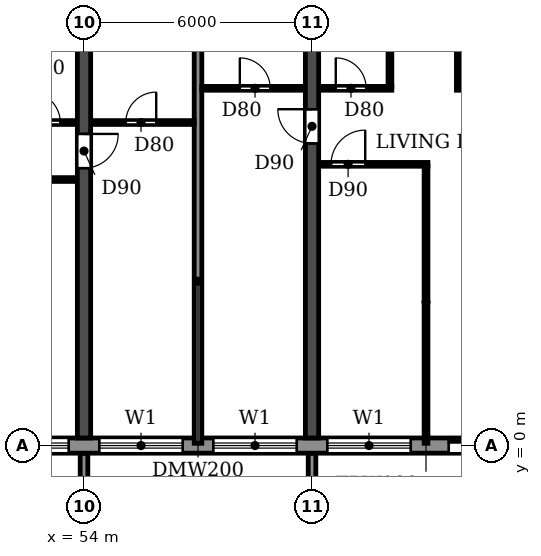
"""IFC4 building model, lengths in metres.
Left out: names, types, materials, properties, quantities, classifications, styles, units other than length and angle.
Written with IfcOpenShell. Run it as: python <this file> out.ifc"""

import sys

from ifc_helpers import new_model, si_unit, direction, frame, frame_2d, origin, place, context, subcontext, project, spatial, polyline, rectangle, outline, extrude, source, transform, mapped, element, fill, save


model = new_model("IFC4")
c1 = context("Model", 3, precision=1e-05, world=origin(), true_north=direction((0.0, 1.0)))
c2 = subcontext(c1, "Body", "Model", "MODEL_VIEW")
j1 = project(units=[si_unit("LENGTHUNIT", "METRE"), si_unit("PLANEANGLEUNIT", "RADIAN")], contexts=[c1])
p1 = place(None, origin())
s1 = spatial("IfcSite", under=j1, at=p1, CompositionType="ELEMENT")
p2 = place(p1, origin())
s2 = spatial("IfcBuilding", under=s1, at=p2, CompositionType="ELEMENT")
p3 = place(p2, frame((0.0, 0.0, 112.5)))
s3 = spatial("IfcBuildingStorey", under=s2, at=p3, CompositionType="ELEMENT", Elevation=112.5)
p4 = place(p3, frame((54.0, 0.2, 0.0), z_axis=(0.0, 0.0, 1.0), x_axis=(0.0, 1.0, 0.0)))
e1 = element("IfcWall", 1, at=p4, inside=s3, PredefinedType="SHEAR", context=c2, shape_type="SweptSolid", body=[
    extrude(rectangle(XDim=11.675, YDim=0.35, at=frame_2d((5.837, 0.0))), origin(), (0.0, 0.0, 1.0), 2.95),
])
p5 = place(p4, frame((7.1, 0.0, 0.0)))
e2 = element("IfcOpeningElement", 2, at=p5, cuts=e1, PredefinedType="OPENING", context=c2, shape_type="SweptSolid", body=[
    extrude(rectangle(XDim=0.9, YDim=2.1, at=frame_2d((0.45, 1.05))), frame((0.0, 0.185, 0.0), z_axis=(0.0, -1.0, 0.0), x_axis=(1.0, 0.0, 0.0)), (0.0, 0.0, 1.0), 0.37),
])
p6 = place(p3, frame((60.0, 0.2, 0.0), z_axis=(0.0, 0.0, 1.0), x_axis=(0.0, 1.0, 0.0)))
e3 = element("IfcWall", 3, at=p6, inside=s3, PredefinedType="SHEAR", context=c2, shape_type="SweptSolid", body=[
    extrude(rectangle(XDim=11.675, YDim=0.35, at=frame_2d((5.837, 0.0))), origin(), (0.0, 0.0, 1.0), 2.95),
])
p7 = place(p6, frame((7.75, 0.0, 0.0)))
e4 = element("IfcOpeningElement", 4, at=p7, cuts=e3, PredefinedType="OPENING", context=c2, shape_type="SweptSolid", body=[
    extrude(rectangle(XDim=0.9, YDim=2.1, at=frame_2d((0.45, 1.05))), frame((0.0, 0.185, 0.0), z_axis=(0.0, -1.0, 0.0), x_axis=(1.0, 0.0, 0.0)), (0.0, 0.0, 1.0), 0.37),
])
p8 = place(p3, frame((16.683, 0.0, 0.0), z_axis=(0.0, 0.0, 1.0), x_axis=(1.0, 0.0, 0.0)))
e5 = element("IfcWall", 5, at=p8, inside=s3, PredefinedType="STANDARD", context=c2, shape_type="SweptSolid", body=[
    extrude(rectangle(XDim=68.634, YDim=0.4, at=frame_2d((34.317, 0.0))), origin(), (0.0, 0.0, 1.0), 2.95),
])
p9 = place(p8, frame((1.717, 0.0, 0.9)))
e6 = element("IfcOpeningElement", 6, at=p9, cuts=e5, PredefinedType="OPENING", context=c2, shape_type="SweptSolid", body=[
    extrude(rectangle(XDim=2.2, YDim=1.5, at=frame_2d((1.1, 0.75))), frame((0.0, 0.21, 0.0), z_axis=(0.0, -1.0, 0.0), x_axis=(1.0, 0.0, 0.0)), (0.0, 0.0, 1.0), 0.42),
])
p10 = place(p8, frame((4.717, 0.0, 0.9)))
e7 = element("IfcOpeningElement", 7, at=p10, cuts=e5, PredefinedType="OPENING", context=c2, shape_type="SweptSolid", body=[
    extrude(rectangle(XDim=2.2, YDim=1.5, at=frame_2d((1.1, 0.75))), frame((0.0, 0.21, 0.0), z_axis=(0.0, -1.0, 0.0), x_axis=(1.0, 0.0, 0.0)), (0.0, 0.0, 1.0), 0.42),
])
p11 = place(p8, frame((7.717, 0.0, 0.9)))
e8 = element("IfcOpeningElement", 8, at=p11, cuts=e5, PredefinedType="OPENING", context=c2, shape_type="SweptSolid", body=[
    extrude(rectangle(XDim=2.2, YDim=1.5, at=frame_2d((1.1, 0.75))), frame((0.0, 0.21, 0.0), z_axis=(0.0, -1.0, 0.0), x_axis=(1.0, 0.0, 0.0)), (0.0, 0.0, 1.0), 0.42),
])
p12 = place(p8, frame((10.917, 0.0, 0.0)))
e9 = element("IfcOpeningElement", 9, at=p12, cuts=e5, PredefinedType="OPENING", context=c2, shape_type="SweptSolid", body=[
    extrude(rectangle(XDim=1.8, YDim=2.4, at=frame_2d((0.9, 1.2))), frame((0.0, 0.21, 0.0), z_axis=(0.0, -1.0, 0.0), x_axis=(1.0, 0.0, 0.0)), (0.0, 0.0, 1.0), 0.42),
])
p13 = place(p8, frame((13.717, 0.0, 0.9)))
e10 = element("IfcOpeningElement", 10, at=p13, cuts=e5, PredefinedType="OPENING", context=c2, shape_type="SweptSolid", body=[
    extrude(rectangle(XDim=2.2, YDim=1.5, at=frame_2d((1.1, 0.75))), frame((0.0, 0.21, 0.0), z_axis=(0.0, -1.0, 0.0), x_axis=(1.0, 0.0, 0.0)), (0.0, 0.0, 1.0), 0.42),
])
p14 = place(p8, frame((16.717, 0.0, 0.9)))
e11 = element("IfcOpeningElement", 11, at=p14, cuts=e5, PredefinedType="OPENING", context=c2, shape_type="SweptSolid", body=[
    extrude(rectangle(XDim=2.2, YDim=1.5, at=frame_2d((1.1, 0.75))), frame((0.0, 0.21, 0.0), z_axis=(0.0, -1.0, 0.0), x_axis=(1.0, 0.0, 0.0)), (0.0, 0.0, 1.0), 0.42),
])
p15 = place(p8, frame((19.717, 0.0, 0.9)))
e12 = element("IfcOpeningElement", 12, at=p15, cuts=e5, PredefinedType="OPENING", context=c2, shape_type="SweptSolid", body=[
    extrude(rectangle(XDim=2.2, YDim=1.5, at=frame_2d((1.1, 0.75))), frame((0.0, 0.21, 0.0), z_axis=(0.0, -1.0, 0.0), x_axis=(1.0, 0.0, 0.0)), (0.0, 0.0, 1.0), 0.42),
])
p16 = place(p8, frame((22.717, 0.0, 0.9)))
e13 = element("IfcOpeningElement", 13, at=p16, cuts=e5, PredefinedType="OPENING", context=c2, shape_type="SweptSolid", body=[
    extrude(rectangle(XDim=2.2, YDim=1.5, at=frame_2d((1.1, 0.75))), frame((0.0, 0.21, 0.0), z_axis=(0.0, -1.0, 0.0), x_axis=(1.0, 0.0, 0.0)), (0.0, 0.0, 1.0), 0.42),
])
p17 = place(p8, frame((25.717, 0.0, 0.9)))
e14 = element("IfcOpeningElement", 14, at=p17, cuts=e5, PredefinedType="OPENING", context=c2, shape_type="SweptSolid", body=[
    extrude(rectangle(XDim=2.2, YDim=1.5, at=frame_2d((1.1, 0.75))), frame((0.0, 0.21, 0.0), z_axis=(0.0, -1.0, 0.0), x_axis=(1.0, 0.0, 0.0)), (0.0, 0.0, 1.0), 0.42),
])
p18 = place(p8, frame((28.717, 0.0, 0.9)))
e15 = element("IfcOpeningElement", 15, at=p18, cuts=e5, PredefinedType="OPENING", context=c2, shape_type="SweptSolid", body=[
    extrude(rectangle(XDim=2.2, YDim=1.5, at=frame_2d((1.1, 0.75))), frame((0.0, 0.21, 0.0), z_axis=(0.0, -1.0, 0.0), x_axis=(1.0, 0.0, 0.0)), (0.0, 0.0, 1.0), 0.42),
])
p19 = place(p8, frame((31.917, 0.0, 0.0)))
e16 = element("IfcOpeningElement", 16, at=p19, cuts=e5, PredefinedType="OPENING", context=c2, shape_type="SweptSolid", body=[
    extrude(rectangle(XDim=1.8, YDim=2.4, at=frame_2d((0.9, 1.2))), frame((0.0, 0.21, 0.0), z_axis=(0.0, -1.0, 0.0), x_axis=(1.0, 0.0, 0.0)), (0.0, 0.0, 1.0), 0.42),
])
p20 = place(p8, frame((34.717, 0.0, 0.9)))
e17 = element("IfcOpeningElement", 17, at=p20, cuts=e5, PredefinedType="OPENING", context=c2, shape_type="SweptSolid", body=[
    extrude(rectangle(XDim=2.2, YDim=1.5, at=frame_2d((1.1, 0.75))), frame((0.0, 0.21, 0.0), z_axis=(0.0, -1.0, 0.0), x_axis=(1.0, 0.0, 0.0)), (0.0, 0.0, 1.0), 0.42),
])
p21 = place(p8, frame((37.717, 0.0, 0.9)))
e18 = element("IfcOpeningElement", 18, at=p21, cuts=e5, PredefinedType="OPENING", context=c2, shape_type="SweptSolid", body=[
    extrude(rectangle(XDim=2.2, YDim=1.5, at=frame_2d((1.1, 0.75))), frame((0.0, 0.21, 0.0), z_axis=(0.0, -1.0, 0.0), x_axis=(1.0, 0.0, 0.0)), (0.0, 0.0, 1.0), 0.42),
])
p22 = place(p8, frame((40.717, 0.0, 0.9)))
e19 = element("IfcOpeningElement", 19, at=p22, cuts=e5, PredefinedType="OPENING", context=c2, shape_type="SweptSolid", body=[
    extrude(rectangle(XDim=2.2, YDim=1.5, at=frame_2d((1.1, 0.75))), frame((0.0, 0.21, 0.0), z_axis=(0.0, -1.0, 0.0), x_axis=(1.0, 0.0, 0.0)), (0.0, 0.0, 1.0), 0.42),
])
p23 = place(p8, frame((43.717, 0.0, 0.9)))
e20 = element("IfcOpeningElement", 20, at=p23, cuts=e5, PredefinedType="OPENING", context=c2, shape_type="SweptSolid", body=[
    extrude(rectangle(XDim=2.2, YDim=1.5, at=frame_2d((1.1, 0.75))), frame((0.0, 0.21, 0.0), z_axis=(0.0, -1.0, 0.0), x_axis=(1.0, 0.0, 0.0)), (0.0, 0.0, 1.0), 0.42),
])
p24 = place(p8, frame((46.917, 0.0, 0.0)))
e21 = element("IfcOpeningElement", 21, at=p24, cuts=e5, PredefinedType="OPENING", context=c2, shape_type="SweptSolid", body=[
    extrude(rectangle(XDim=1.8, YDim=2.4, at=frame_2d((0.9, 1.2))), frame((0.0, 0.21, 0.0), z_axis=(0.0, -1.0, 0.0), x_axis=(1.0, 0.0, 0.0)), (0.0, 0.0, 1.0), 0.42),
])
p25 = place(p8, frame((49.717, 0.0, 0.9)))
e22 = element("IfcOpeningElement", 22, at=p25, cuts=e5, PredefinedType="OPENING", context=c2, shape_type="SweptSolid", body=[
    extrude(rectangle(XDim=2.2, YDim=1.5, at=frame_2d((1.1, 0.75))), frame((0.0, 0.21, 0.0), z_axis=(0.0, -1.0, 0.0), x_axis=(1.0, 0.0, 0.0)), (0.0, 0.0, 1.0), 0.42),
])
p26 = place(p8, frame((52.717, 0.0, 0.9)))
e23 = element("IfcOpeningElement", 23, at=p26, cuts=e5, PredefinedType="OPENING", context=c2, shape_type="SweptSolid", body=[
    extrude(rectangle(XDim=2.2, YDim=1.5, at=frame_2d((1.1, 0.75))), frame((0.0, 0.21, 0.0), z_axis=(0.0, -1.0, 0.0), x_axis=(1.0, 0.0, 0.0)), (0.0, 0.0, 1.0), 0.42),
])
p27 = place(p8, frame((55.717, 0.0, 0.9)))
e24 = element("IfcOpeningElement", 24, at=p27, cuts=e5, PredefinedType="OPENING", context=c2, shape_type="SweptSolid", body=[
    extrude(rectangle(XDim=2.2, YDim=1.5, at=frame_2d((1.1, 0.75))), frame((0.0, 0.21, 0.0), z_axis=(0.0, -1.0, 0.0), x_axis=(1.0, 0.0, 0.0)), (0.0, 0.0, 1.0), 0.42),
])
p28 = place(p8, frame((58.717, 0.0, 0.9)))
e25 = element("IfcOpeningElement", 25, at=p28, cuts=e5, PredefinedType="OPENING", context=c2, shape_type="SweptSolid", body=[
    extrude(rectangle(XDim=2.2, YDim=1.5, at=frame_2d((1.1, 0.75))), frame((0.0, 0.21, 0.0), z_axis=(0.0, -1.0, 0.0), x_axis=(1.0, 0.0, 0.0)), (0.0, 0.0, 1.0), 0.42),
])
p29 = place(p8, frame((61.717, 0.0, 0.9)))
e26 = element("IfcOpeningElement", 26, at=p29, cuts=e5, PredefinedType="OPENING", context=c2, shape_type="SweptSolid", body=[
    extrude(rectangle(XDim=2.2, YDim=1.5, at=frame_2d((1.1, 0.75))), frame((0.0, 0.21, 0.0), z_axis=(0.0, -1.0, 0.0), x_axis=(1.0, 0.0, 0.0)), (0.0, 0.0, 1.0), 0.42),
])
p30 = place(p8, frame((64.717, 0.0, 0.9)))
e27 = element("IfcOpeningElement", 27, at=p30, cuts=e5, PredefinedType="OPENING", context=c2, shape_type="SweptSolid", body=[
    extrude(rectangle(XDim=2.2, YDim=1.5, at=frame_2d((1.1, 0.75))), frame((0.0, 0.21, 0.0), z_axis=(0.0, -1.0, 0.0), x_axis=(1.0, 0.0, 0.0)), (0.0, 0.0, 1.0), 0.42),
])
m1 = source(origin(), c2, "Body", "SweptSolid", [
    extrude(outline(polyline([(0.0, 0.0), (0.2, 0.0), (0.2, 1.65), (0.0, 1.65), (0.0, 0.0)])), origin(), (0.0, 0.0, 1.0), 3.1),
])
for number, where in (
    (28, (53.9, -1.85, 0.0)),
    (29, (59.9, -1.85, 0.0)),
):
    element("IfcWall", number, at=place(p3, frame(where)), inside=s3, PredefinedType="STANDARD", context=c2, shape_type="MappedRepresentation", body=[
        mapped(m1, transform((0.0, 0.0, 0.0))),
    ])
p31 = place(p3, frame((57.0, 0.06, 0.0), z_axis=(0.0, 0.0, 1.0), x_axis=(0.0, 1.0, 0.0)))
e30 = element("IfcWall", 30, at=p31, inside=s3, PredefinedType="PARTITIONING", context=c2, shape_type="SweptSolid", body=[
    extrude(rectangle(XDim=11.805, YDim=0.2, at=frame_2d((5.902, 0.0))), origin(), (0.0, 0.0, 1.0), 2.95),
])
p32 = place(p3, frame((50.95, 7.0, 0.0), z_axis=(0.0, 0.0, 1.0), x_axis=(1.0, 0.0, 0.0)))
e31 = element("IfcWall", 31, at=p32, inside=s3, PredefinedType="PARTITIONING", context=c2, shape_type="SweptSolid", body=[
    extrude(rectangle(XDim=2.865, YDim=0.1, at=frame_2d((1.433, 0.0))), origin(), (0.0, 0.0, 1.0), 2.95),
])
p33 = place(p32, frame((0.55, 0.0, 0.0)))
e32 = element("IfcOpeningElement", 32, at=p33, cuts=e31, PredefinedType="OPENING", context=c2, shape_type="SweptSolid", body=[
    extrude(rectangle(XDim=0.9, YDim=2.1, at=frame_2d((0.45, 1.05))), frame((0.0, 0.06, 0.0), z_axis=(0.0, -1.0, 0.0), x_axis=(1.0, 0.0, 0.0)), (0.0, 0.0, 1.0), 0.12),
])
p34 = place(p3, frame((60.185, 7.4, 0.0), z_axis=(0.0, 0.0, 1.0), x_axis=(1.0, 0.0, 0.0)))
e33 = element("IfcWall", 33, at=p34, inside=s3, PredefinedType="PARTITIONING", context=c2, shape_type="SweptSolid", body=[
    extrude(rectangle(XDim=2.865, YDim=0.1, at=frame_2d((1.433, 0.0))), origin(), (0.0, 0.0, 1.0), 2.95),
])
p35 = place(p34, frame((0.315, 0.0, 0.0)))
e34 = element("IfcOpeningElement", 34, at=p35, cuts=e33, PredefinedType="OPENING", context=c2, shape_type="SweptSolid", body=[
    extrude(rectangle(XDim=0.9, YDim=2.1, at=frame_2d((0.45, 1.05))), frame((0.0, 0.06, 0.0), z_axis=(0.0, -1.0, 0.0), x_axis=(1.0, 0.0, 0.0)), (0.0, 0.0, 1.0), 0.12),
])
p36 = place(p3, frame((51.9, 8.5, 0.0), z_axis=(0.0, 0.0, 1.0), x_axis=(1.0, 0.0, 0.0)))
e35 = element("IfcWall", 35, at=p36, inside=s3, PredefinedType="PARTITIONING", context=c2, shape_type="SweptSolid", body=[
    extrude(rectangle(XDim=1.915, YDim=0.1, at=frame_2d((0.958, 0.0))), origin(), (0.0, 0.0, 1.0), 2.95),
])
p37 = place(p36, frame((0.675, 0.0, 0.0)))
e36 = element("IfcOpeningElement", 36, at=p37, cuts=e35, PredefinedType="OPENING", context=c2, shape_type="SweptSolid", body=[
    extrude(rectangle(XDim=0.8, YDim=2.1, at=frame_2d((0.4, 1.05))), frame((0.0, 0.06, 0.0), z_axis=(0.0, -1.0, 0.0), x_axis=(1.0, 0.0, 0.0)), (0.0, 0.0, 1.0), 0.12),
])
p38 = place(p3, frame((54.185, 8.5, 0.0), z_axis=(0.0, 0.0, 1.0), x_axis=(1.0, 0.0, 0.0)))
e37 = element("IfcWall", 37, at=p38, inside=s3, PredefinedType="PARTITIONING", context=c2, shape_type="SweptSolid", body=[
    extrude(rectangle(XDim=2.715, YDim=0.1, at=frame_2d((1.357, 0.0))), origin(), (0.0, 0.0, 1.0), 2.95),
])
p39 = place(p38, frame((0.915, 0.0, 0.0)))
e38 = element("IfcOpeningElement", 38, at=p39, cuts=e37, PredefinedType="OPENING", context=c2, shape_type="SweptSolid", body=[
    extrude(rectangle(XDim=0.8, YDim=2.1, at=frame_2d((0.4, 1.05))), frame((0.0, 0.06, 0.0), z_axis=(0.0, -1.0, 0.0), x_axis=(1.0, 0.0, 0.0)), (0.0, 0.0, 1.0), 0.12),
])
p40 = place(p3, frame((57.1, 9.4, 0.0), z_axis=(0.0, 0.0, 1.0), x_axis=(1.0, 0.0, 0.0)))
e39 = element("IfcWall", 39, at=p40, inside=s3, PredefinedType="PARTITIONING", context=c2, shape_type="SweptSolid", body=[
    extrude(rectangle(XDim=2.715, YDim=0.1, at=frame_2d((1.357, 0.0))), origin(), (0.0, 0.0, 1.0), 2.95),
])
p41 = place(p40, frame((1.0, 0.0, 0.0)))
e40 = element("IfcOpeningElement", 40, at=p41, cuts=e39, PredefinedType="OPENING", context=c2, shape_type="SweptSolid", body=[
    extrude(rectangle(XDim=0.8, YDim=2.1, at=frame_2d((0.4, 1.05))), frame((0.0, 0.06, 0.0), z_axis=(0.0, -1.0, 0.0), x_axis=(1.0, 0.0, 0.0)), (0.0, 0.0, 1.0), 0.12),
])
p42 = place(p3, frame((60.185, 9.4, 0.0), z_axis=(0.0, 0.0, 1.0), x_axis=(1.0, 0.0, 0.0)))
e41 = element("IfcWall", 41, at=p42, inside=s3, PredefinedType="PARTITIONING", context=c2, shape_type="SweptSolid", body=[
    extrude(rectangle(XDim=1.915, YDim=0.1, at=frame_2d((0.958, 0.0))), origin(), (0.0, 0.0, 1.0), 2.95),
])
p43 = place(p42, frame((0.44, 0.0, 0.0)))
e42 = element("IfcOpeningElement", 42, at=p43, cuts=e41, PredefinedType="OPENING", context=c2, shape_type="SweptSolid", body=[
    extrude(rectangle(XDim=0.8, YDim=2.1, at=frame_2d((0.4, 1.05))), frame((0.0, 0.06, 0.0), z_axis=(0.0, -1.0, 0.0), x_axis=(1.0, 0.0, 0.0)), (0.0, 0.0, 1.0), 0.12),
])
p44 = place(p3, frame((63.8, 9.4, 0.0), z_axis=(0.0, 0.0, 1.0), x_axis=(1.0, 0.0, 0.0)))
e43 = element("IfcWall", 43, at=p44, inside=s3, PredefinedType="PARTITIONING", context=c2, shape_type="SweptSolid", body=[
    extrude(rectangle(XDim=2.015, YDim=0.1, at=frame_2d((1.007, 0.0))), origin(), (0.0, 0.0, 1.0), 2.95),
])
p45 = place(p44, frame((0.675, 0.0, 0.0)))
e44 = element("IfcOpeningElement", 44, at=p45, cuts=e43, PredefinedType="OPENING", context=c2, shape_type="SweptSolid", body=[
    extrude(rectangle(XDim=0.9, YDim=2.1, at=frame_2d((0.45, 1.05))), frame((0.0, 0.06, 0.0), z_axis=(0.0, -1.0, 0.0), x_axis=(1.0, 0.0, 0.0)), (0.0, 0.0, 1.0), 0.12),
])
p46 = place(p3, frame((62.05, 9.45, 0.0), z_axis=(0.0, 0.0, 1.0), x_axis=(0.0, 1.0, 0.0)))
e45 = element("IfcWall", 45, at=p46, inside=s3, PredefinedType="PARTITIONING", context=c2, shape_type="SweptSolid", body=[
    extrude(rectangle(XDim=2.415, YDim=0.1, at=frame_2d((1.208, 0.0))), origin(), (0.0, 0.0, 1.0), 2.95),
])
p47 = place(p3, frame((63.0, 0.06, 0.0), z_axis=(0.0, 0.0, 1.0), x_axis=(0.0, 1.0, 0.0)))
e46 = element("IfcWall", 46, at=p47, inside=s3, PredefinedType="PARTITIONING", context=c2, shape_type="SweptSolid", body=[
    extrude(rectangle(XDim=7.29, YDim=0.1, at=frame_2d((3.645, 0.0))), origin(), (0.0, 0.0, 1.0), 2.95),
])
p48 = place(p3, frame((63.85, 9.45, 0.0), z_axis=(0.0, 0.0, 1.0), x_axis=(0.0, 1.0, 0.0)))
e47 = element("IfcWall", 47, at=p48, inside=s3, PredefinedType="PARTITIONING", context=c2, shape_type="SweptSolid", body=[
    extrude(rectangle(XDim=2.415, YDim=0.1, at=frame_2d((1.208, 0.0))), origin(), (0.0, 0.0, 1.0), 2.95),
])
p49 = place(p20, origin())
e48 = element("IfcWindow", 48, at=p49, inside=s3, PartitioningType="DOUBLE_PANEL_HORIZONTAL", PredefinedType="WINDOW", context=c2, shape_type="SweptSolid", body=[
    extrude(rectangle(XDim=2.2, YDim=1.5, at=frame_2d((1.1, 0.75))), frame((0.0, 0.03, 0.0), z_axis=(0.0, -1.0, 0.0), x_axis=(1.0, 0.0, 0.0)), (0.0, 0.0, 1.0), 0.06),
])
fill(e17, e48)
p50 = place(p21, origin())
e49 = element("IfcWindow", 49, at=p50, inside=s3, PartitioningType="DOUBLE_PANEL_HORIZONTAL", PredefinedType="WINDOW", context=c2, shape_type="SweptSolid", body=[
    extrude(rectangle(XDim=2.2, YDim=1.5, at=frame_2d((1.1, 0.75))), frame((0.0, 0.03, 0.0), z_axis=(0.0, -1.0, 0.0), x_axis=(1.0, 0.0, 0.0)), (0.0, 0.0, 1.0), 0.06),
])
fill(e18, e49)
p51 = place(p22, origin())
e50 = element("IfcWindow", 50, at=p51, inside=s3, PartitioningType="DOUBLE_PANEL_HORIZONTAL", PredefinedType="WINDOW", context=c2, shape_type="SweptSolid", body=[
    extrude(rectangle(XDim=2.2, YDim=1.5, at=frame_2d((1.1, 0.75))), frame((0.0, 0.03, 0.0), z_axis=(0.0, -1.0, 0.0), x_axis=(1.0, 0.0, 0.0)), (0.0, 0.0, 1.0), 0.06),
])
fill(e19, e50)
p52 = place(p23, origin())
e51 = element("IfcWindow", 51, at=p52, inside=s3, PartitioningType="DOUBLE_PANEL_HORIZONTAL", PredefinedType="WINDOW", context=c2, shape_type="SweptSolid", body=[
    extrude(rectangle(XDim=2.2, YDim=1.5, at=frame_2d((1.1, 0.75))), frame((0.0, 0.03, 0.0), z_axis=(0.0, -1.0, 0.0), x_axis=(1.0, 0.0, 0.0)), (0.0, 0.0, 1.0), 0.06),
])
fill(e20, e51)
p53 = place(p24, origin())
e52 = element("IfcDoor", 52, at=p53, inside=s3, OperationType="DOUBLE_DOOR_SLIDING", PredefinedType="DOOR", context=c2, shape_type="SweptSolid", body=[
    extrude(rectangle(XDim=1.8, YDim=2.4, at=frame_2d((0.9, 1.2))), frame((0.0, 0.025, 0.0), z_axis=(0.0, -1.0, 0.0), x_axis=(1.0, 0.0, 0.0)), (0.0, 0.0, 1.0), 0.05),
])
fill(e21, e52)
p54 = place(p39, origin())
e53 = element("IfcDoor", 53, at=p54, inside=s3, OperationType="SINGLE_SWING_RIGHT", PredefinedType="DOOR", context=c2, shape_type="SweptSolid", body=[
    extrude(rectangle(XDim=0.8, YDim=2.1, at=frame_2d((0.4, 1.05))), frame((0.0, 0.025, 0.0), z_axis=(0.0, -1.0, 0.0), x_axis=(1.0, 0.0, 0.0)), (0.0, 0.0, 1.0), 0.05),
])
fill(e38, e53)
p55 = place(p37, origin())
e54 = element("IfcDoor", 54, at=p55, inside=s3, OperationType="SINGLE_SWING_LEFT", PredefinedType="DOOR", context=c2, shape_type="SweptSolid", body=[
    extrude(rectangle(XDim=0.8, YDim=2.1, at=frame_2d((0.4, 1.05))), frame((0.0, 0.025, 0.0), z_axis=(0.0, -1.0, 0.0), x_axis=(1.0, 0.0, 0.0)), (0.0, 0.0, 1.0), 0.05),
])
fill(e36, e54)
p56 = place(p5, frame((0.9, 0.0, 0.0), z_axis=(0.0, 0.0, 1.0), x_axis=(-1.0, 0.0, 0.0)))
e55 = element("IfcDoor", 55, at=p56, inside=s3, OperationType="SINGLE_SWING_LEFT", PredefinedType="DOOR", context=c2, shape_type="SweptSolid", body=[
    extrude(rectangle(XDim=0.9, YDim=2.1, at=frame_2d((0.45, 1.05))), frame((0.0, 0.025, 0.0), z_axis=(0.0, -1.0, 0.0), x_axis=(1.0, 0.0, 0.0)), (0.0, 0.0, 1.0), 0.05),
])
fill(e2, e55)
p57 = place(p41, origin())
e56 = element("IfcDoor", 56, at=p57, inside=s3, OperationType="SINGLE_SWING_LEFT", PredefinedType="DOOR", context=c2, shape_type="SweptSolid", body=[
    extrude(rectangle(XDim=0.8, YDim=2.1, at=frame_2d((0.4, 1.05))), frame((0.0, 0.025, 0.0), z_axis=(0.0, -1.0, 0.0), x_axis=(1.0, 0.0, 0.0)), (0.0, 0.0, 1.0), 0.05),
])
fill(e40, e56)
p58 = place(p7, origin())
e57 = element("IfcDoor", 57, at=p58, inside=s3, OperationType="SINGLE_SWING_RIGHT", PredefinedType="DOOR", context=c2, shape_type="SweptSolid", body=[
    extrude(rectangle(XDim=0.9, YDim=2.1, at=frame_2d((0.45, 1.05))), frame((0.0, 0.025, 0.0), z_axis=(0.0, -1.0, 0.0), x_axis=(1.0, 0.0, 0.0)), (0.0, 0.0, 1.0), 0.05),
])
fill(e4, e57)
p59 = place(p35, origin())
e58 = element("IfcDoor", 58, at=p59, inside=s3, OperationType="SINGLE_SWING_RIGHT", PredefinedType="DOOR", context=c2, shape_type="SweptSolid", body=[
    extrude(rectangle(XDim=0.9, YDim=2.1, at=frame_2d((0.45, 1.05))), frame((0.0, 0.025, 0.0), z_axis=(0.0, -1.0, 0.0), x_axis=(1.0, 0.0, 0.0)), (0.0, 0.0, 1.0), 0.05),
])
fill(e34, e58)
p60 = place(p43, origin())
e59 = element("IfcDoor", 59, at=p60, inside=s3, OperationType="SINGLE_SWING_LEFT", PredefinedType="DOOR", context=c2, shape_type="SweptSolid", body=[
    extrude(rectangle(XDim=0.8, YDim=2.1, at=frame_2d((0.4, 1.05))), frame((0.0, 0.025, 0.0), z_axis=(0.0, -1.0, 0.0), x_axis=(1.0, 0.0, 0.0)), (0.0, 0.0, 1.0), 0.05),
])
fill(e42, e59)
save(model, sys.argv[1])
